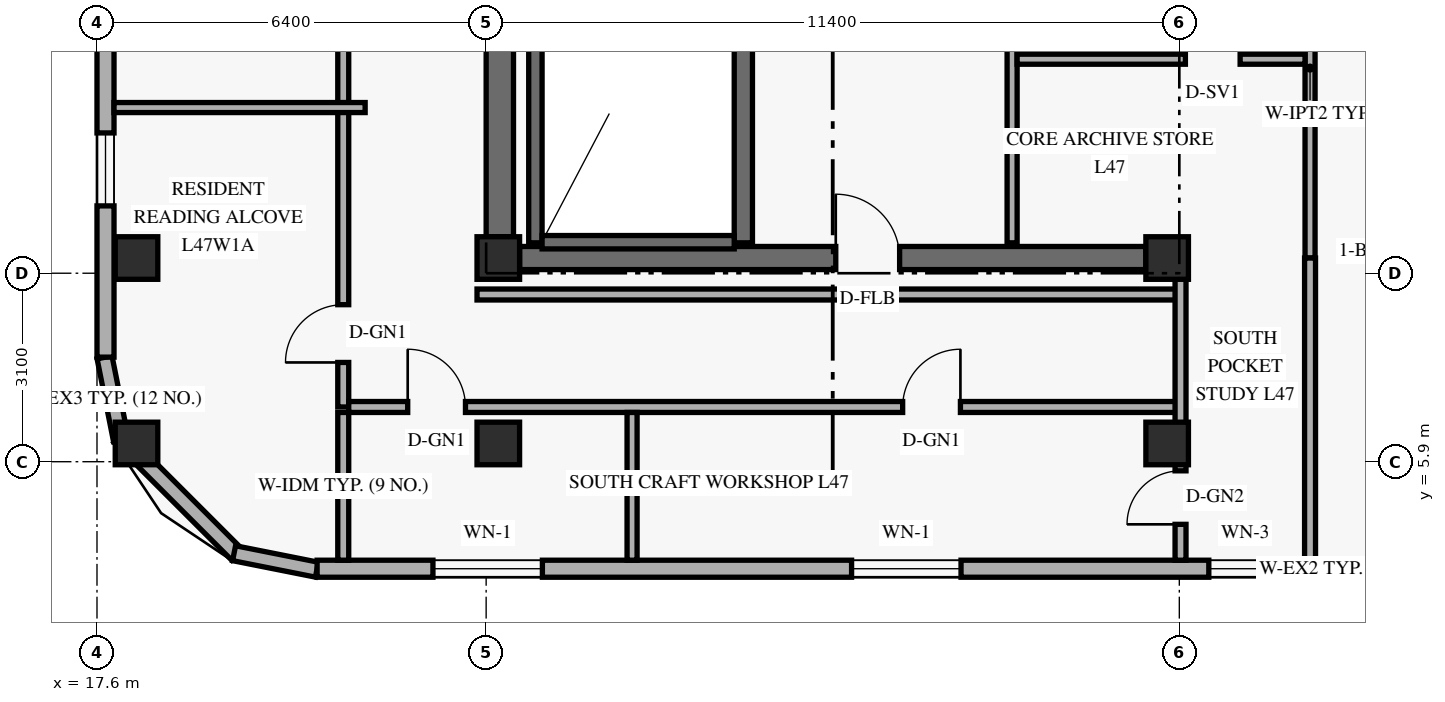
"""IFC4 building model, lengths in metres.
Left out: names, types, materials, properties, quantities, classifications, styles, units other than length and angle.
Written with IfcOpenShell. Run it as: python <this file> out.ifc"""

import sys

from ifc_helpers import new_model, si_unit, direction, frame, frame_2d, origin, origin_2d, place, context, subcontext, project, spatial, rectangle, extrude, element, fill, save


model = new_model("IFC4")
c1 = context("Model", 3, precision=1e-05, world=origin(), true_north=direction((0.0, 1.0)))
c2 = subcontext(c1, "Body", "Model", "MODEL_VIEW")
j1 = project(units=[si_unit("LENGTHUNIT", "METRE"), si_unit("PLANEANGLEUNIT", "RADIAN")], contexts=[c1])
p1 = place(None, origin())
s1 = spatial("IfcSite", under=j1, at=p1, CompositionType="ELEMENT")
p2 = place(p1, origin())
s2 = spatial("IfcBuilding", under=s1, at=p2, CompositionType="ELEMENT")
p3 = place(p2, frame((0.0, 0.0, 181.2)))
s3 = spatial("IfcBuildingStorey", under=s2, at=p3, CompositionType="ELEMENT", Elevation=181.2)
p4 = place(p3, frame((24.225, 9.6, 0.0), z_axis=(0.0, 0.0, 1.0), x_axis=(0.0, 1.0, 0.0)))
e1 = element("IfcWall", 1, at=p4, inside=s3, PredefinedType="SHEAR", context=c2, shape_type="SweptSolid", body=[
    extrude(rectangle(XDim=7.6, YDim=0.45, at=frame_2d((3.8, 0.0))), origin(), (0.0, 0.0, 1.0), 2.748),
])
p5 = place(p3, frame((24.55, 9.25, 0.0), z_axis=(0.0, 0.0, 1.0), x_axis=(1.0, 0.0, 0.0)))
e2 = element("IfcWall", 2, at=p5, inside=s3, PredefinedType="SHEAR", context=c2, shape_type="SweptSolid", body=[
    extrude(rectangle(XDim=10.3, YDim=0.38, at=frame_2d((5.15, 0.0))), origin(), (0.0, 0.0, 1.0), 3.36),
])
p6 = place(p5, frame((5.2, 0.0, 0.0)))
e3 = element("IfcOpeningElement", 3, at=p6, cuts=e2, PredefinedType="OPENING", context=c2, shape_type="SweptSolid", body=[
    extrude(rectangle(XDim=1.05, YDim=2.15, at=frame_2d((0.525, 1.075))), frame((0.0, 0.2, 0.0), z_axis=(0.0, -1.0, 0.0), x_axis=(1.0, 0.0, 0.0)), (0.0, 0.0, 1.0), 0.4),
])
p7 = place(p3, frame((24.81, 9.5, 0.0), z_axis=(0.0, 0.0, 1.0), x_axis=(0.0, 1.0, 0.0)))
e4 = element("IfcWall", 4, at=p7, inside=s3, PredefinedType="SHEAR", context=c2, shape_type="SweptSolid", body=[
    extrude(rectangle(XDim=7.76, YDim=0.22, at=frame_2d((3.88, 0.0))), origin(), (0.0, 0.0, 1.0), 3.36),
])
p8 = place(p3, frame((28.23, 9.5, 0.0), z_axis=(0.0, 0.0, 1.0), x_axis=(0.0, 1.0, 0.0)))
e5 = element("IfcWall", 5, at=p8, inside=s3, PredefinedType="SHEAR", context=c2, shape_type="SweptSolid", body=[
    extrude(rectangle(XDim=7.76, YDim=0.3, at=frame_2d((3.88, 0.0))), origin(), (0.0, 0.0, 1.0), 3.36),
])
p9 = place(p3, frame((24.92, 9.51, 0.0), z_axis=(0.0, 0.0, 1.0), x_axis=(1.0, 0.0, 0.0)))
e6 = element("IfcWall", 6, at=p9, inside=s3, PredefinedType="SHEAR", context=c2, shape_type="SweptSolid", body=[
    extrude(rectangle(XDim=3.16, YDim=0.22, at=frame_2d((1.58, 0.0))), origin(), (0.0, 0.0, 1.0), 3.36),
])
for number, where, z_axis, x_axis in (
    (7, (18.25, 6.2, 0.0), (0.0, 0.0, 1.0), (1.0, 0.0, 0.0)),
    (8, (18.25, 9.25, 0.0), (0.0, 0.0, 1.0), (1.0, 0.0, 0.0)),
    (9, (24.2, 6.2, 0.0), (0.0, 0.0, 1.0), (1.0, 0.0, 0.0)),
    (10, (24.2, 9.25, 0.0), (0.0, 0.0, 1.0), (1.0, 0.0, 0.0)),
    (11, (35.2, 6.2, 0.0), (0.0, 0.0, 1.0), (1.0, 0.0, 0.0)),
    (12, (35.2, 9.25, 0.0), (0.0, 0.0, 1.0), (1.0, 0.0, 0.0)),
):
    element("IfcColumn", number, at=place(p3, frame(where, z_axis=z_axis, x_axis=x_axis)), inside=s3, PredefinedType="COLUMN", context=c2, shape_type="SweptSolid", body=[
        extrude(rectangle(XDim=0.7, YDim=0.7, at=origin_2d()), origin(), (0.0, 0.0, 1.0), 3.6),
    ])
p10 = place(p3, frame((17.724, 7.616, 0.0), z_axis=(0.0, 0.0, 1.0), x_axis=(0.195135625965, -0.9807762678, 0.0)))
e13 = element("IfcWall", 13, at=p10, inside=s3, PredefinedType="SOLIDWALL", context=c2, shape_type="SweptSolid", body=[
    extrude(rectangle(XDim=1.389, YDim=0.25, at=frame_2d((0.694, 0.0))), origin(), (0.0, 0.0, 1.0), 3.36),
])
p11 = place(p3, frame((17.968, 6.305, 0.0), z_axis=(0.0, 0.0, 1.0), x_axis=(0.707106781187, -0.707106781187, 0.0)))
e14 = element("IfcWall", 14, at=p11, inside=s3, PredefinedType="SOLIDWALL", context=c2, shape_type="SweptSolid", body=[
    extrude(rectangle(XDim=2.739, YDim=0.25, at=frame_2d((1.37, 0.0))), origin(), (0.0, 0.0, 1.0), 3.36),
])
p12 = place(p3, frame((19.854, 4.395, 0.0), z_axis=(0.0, 0.0, 1.0), x_axis=(0.980809899341, -0.19496651342, 0.0)))
e15 = element("IfcWall", 15, at=p12, inside=s3, PredefinedType="SOLIDWALL", context=c2, shape_type="SweptSolid", body=[
    extrude(rectangle(XDim=1.389, YDim=0.25, at=frame_2d((0.694, 0.0))), origin(), (0.0, 0.0, 1.0), 3.36),
])
p13 = place(p3, frame((21.22, 4.14, 0.0), z_axis=(0.0, 0.0, 1.0), x_axis=(1.0, 0.0, 0.0)))
e16 = element("IfcWall", 16, at=p13, inside=s3, PredefinedType="SOLIDWALL", context=c2, shape_type="SweptSolid", body=[
    extrude(rectangle(XDim=33.76, YDim=0.28, at=frame_2d((16.88, 0.0))), origin(), (0.0, 0.0, 1.0), 3.36),
])
p14 = place(p13, frame((1.905, 0.0, 0.85)))
e17 = element("IfcOpeningElement", 17, at=p14, cuts=e16, PredefinedType="OPENING", context=c2, shape_type="SweptSolid", body=[
    extrude(rectangle(XDim=1.8, YDim=1.6, at=frame_2d((0.9, 0.8))), frame((0.0, 0.15, 0.0), z_axis=(0.0, -1.0, 0.0), x_axis=(1.0, 0.0, 0.0)), (0.0, 0.0, 1.0), 0.3),
])
p15 = place(p13, frame((8.79, 0.0, 0.85)))
e18 = element("IfcOpeningElement", 18, at=p15, cuts=e16, PredefinedType="OPENING", context=c2, shape_type="SweptSolid", body=[
    extrude(rectangle(XDim=1.8, YDim=1.6, at=frame_2d((0.9, 0.8))), frame((0.0, 0.15, 0.0), z_axis=(0.0, -1.0, 0.0), x_axis=(1.0, 0.0, 0.0)), (0.0, 0.0, 1.0), 0.3),
])
p16 = place(p13, frame((14.665, 0.0, 0.85)))
e19 = element("IfcOpeningElement", 19, at=p16, cuts=e16, PredefinedType="OPENING", context=c2, shape_type="SweptSolid", body=[
    extrude(rectangle(XDim=1.2, YDim=1.5, at=frame_2d((0.6, 0.75))), frame((0.0, 0.15, 0.0), z_axis=(0.0, -1.0, 0.0), x_axis=(1.0, 0.0, 0.0)), (0.0, 0.0, 1.0), 0.3),
])
p17 = place(p13, frame((18.525, 0.0, 0.85)))
e20 = element("IfcOpeningElement", 20, at=p17, cuts=e16, PredefinedType="OPENING", context=c2, shape_type="SweptSolid", body=[
    extrude(rectangle(XDim=1.8, YDim=1.6, at=frame_2d((0.9, 0.8))), frame((0.0, 0.15, 0.0), z_axis=(0.0, -1.0, 0.0), x_axis=(1.0, 0.0, 0.0)), (0.0, 0.0, 1.0), 0.3),
])
p18 = place(p13, frame((23.65, 0.0, 0.85)))
e21 = element("IfcOpeningElement", 21, at=p18, cuts=e16, PredefinedType="OPENING", context=c2, shape_type="SweptSolid", body=[
    extrude(rectangle(XDim=1.8, YDim=1.6, at=frame_2d((0.9, 0.8))), frame((0.0, 0.15, 0.0), z_axis=(0.0, -1.0, 0.0), x_axis=(1.0, 0.0, 0.0)), (0.0, 0.0, 1.0), 0.3),
])
p19 = place(p13, frame((26.88, 0.0, 0.85)))
e22 = element("IfcOpeningElement", 22, at=p19, cuts=e16, PredefinedType="OPENING", context=c2, shape_type="SweptSolid", body=[
    extrude(rectangle(XDim=1.2, YDim=1.5, at=frame_2d((0.6, 0.75))), frame((0.0, 0.15, 0.0), z_axis=(0.0, -1.0, 0.0), x_axis=(1.0, 0.0, 0.0)), (0.0, 0.0, 1.0), 0.3),
])
p20 = place(p13, frame((30.17, 0.0, 0.85)))
e23 = element("IfcOpeningElement", 23, at=p20, cuts=e16, PredefinedType="OPENING", context=c2, shape_type="SweptSolid", body=[
    extrude(rectangle(XDim=1.8, YDim=1.6, at=frame_2d((0.9, 0.8))), frame((0.0, 0.15, 0.0), z_axis=(0.0, -1.0, 0.0), x_axis=(1.0, 0.0, 0.0)), (0.0, 0.0, 1.0), 0.3),
])
p21 = place(p3, frame((17.74, 40.38, 0.0), z_axis=(0.0, 0.0, 1.0), x_axis=(0.0, -1.0, 0.0)))
e24 = element("IfcWall", 24, at=p21, inside=s3, PredefinedType="SOLIDWALL", context=c2, shape_type="SweptSolid", body=[
    extrude(rectangle(XDim=32.76, YDim=0.28, at=frame_2d((16.38, 0.0))), origin(), (0.0, 0.0, 1.0), 3.36),
])
p22 = place(p21, frame((29.073, 0.0, 0.85)))
e25 = element("IfcOpeningElement", 25, at=p22, cuts=e24, PredefinedType="OPENING", context=c2, shape_type="SweptSolid", body=[
    extrude(rectangle(XDim=1.2, YDim=1.5, at=frame_2d((0.6, 0.75))), frame((0.0, 0.15, 0.0), z_axis=(0.0, -1.0, 0.0), x_axis=(1.0, 0.0, 0.0)), (0.0, 0.0, 1.0), 0.3),
])
p23 = place(p21, frame((25.363, 0.0, 0.85)))
e26 = element("IfcOpeningElement", 26, at=p23, cuts=e24, PredefinedType="OPENING", context=c2, shape_type="SweptSolid", body=[
    extrude(rectangle(XDim=1.2, YDim=1.5, at=frame_2d((0.6, 0.75))), frame((0.0, 0.15, 0.0), z_axis=(0.0, -1.0, 0.0), x_axis=(1.0, 0.0, 0.0)), (0.0, 0.0, 1.0), 0.3),
])
p24 = place(p21, frame((15.7, 0.0, 0.85)))
e27 = element("IfcOpeningElement", 27, at=p24, cuts=e24, PredefinedType="OPENING", context=c2, shape_type="SweptSolid", body=[
    extrude(rectangle(XDim=1.2, YDim=1.5, at=frame_2d((0.6, 0.75))), frame((0.0, 0.15, 0.0), z_axis=(0.0, -1.0, 0.0), x_axis=(1.0, 0.0, 0.0)), (0.0, 0.0, 1.0), 0.3),
])
p25 = place(p21, frame((5.288, 0.0, 0.85)))
e28 = element("IfcOpeningElement", 28, at=p25, cuts=e24, PredefinedType="OPENING", context=c2, shape_type="SweptSolid", body=[
    extrude(rectangle(XDim=1.2, YDim=1.5, at=frame_2d((0.6, 0.75))), frame((0.0, 0.15, 0.0), z_axis=(0.0, -1.0, 0.0), x_axis=(1.0, 0.0, 0.0)), (0.0, 0.0, 1.0), 0.3),
])
p26 = place(p3, frame((32.65, 9.5, 0.0), z_axis=(0.0, 0.0, 1.0), x_axis=(0.0, 1.0, 0.0)))
e29 = element("IfcWall", 29, at=p26, inside=s3, PredefinedType="PARTITIONING", context=c2, shape_type="SweptSolid", body=[
    extrude(rectangle(XDim=6.08, YDim=0.165, at=frame_2d((3.04, 0.0))), origin(), (0.0, 0.0, 1.0), 3.36),
])
p27 = place(p3, frame((37.55, 9.25, 0.0), z_axis=(0.0, 0.0, 1.0), x_axis=(0.0, 1.0, 0.0)))
e30 = element("IfcWall", 30, at=p27, inside=s3, PredefinedType="PARTITIONING", context=c2, shape_type="SweptSolid", body=[
    extrude(rectangle(XDim=6.248, YDim=0.165, at=frame_2d((3.124, 0.0))), origin(), (0.0, 0.0, 1.0), 2.73),
])
p28 = place(p3, frame((32.732, 12.52, 0.0), z_axis=(0.0, 0.0, 1.0), x_axis=(1.0, 0.0, 0.0)))
e31 = element("IfcWall", 31, at=p28, inside=s3, PredefinedType="PARTITIONING", context=c2, shape_type="SweptSolid", body=[
    extrude(rectangle(XDim=4.735, YDim=0.165, at=frame_2d((2.368, 0.0))), origin(), (0.0, 0.0, 1.0), 2.73),
])
p29 = place(p28, frame((2.768, 0.0, 0.0)))
e32 = element("IfcOpeningElement", 32, at=p29, cuts=e31, PredefinedType="OPENING", context=c2, shape_type="SweptSolid", body=[
    extrude(rectangle(XDim=0.9, YDim=2.1, at=frame_2d((0.45, 1.05))), frame((0.0, 0.093, 0.0), z_axis=(0.0, -1.0, 0.0), x_axis=(1.0, 0.0, 0.0)), (0.0, 0.0, 1.0), 0.185),
])
p30 = place(p3, frame((21.65, 6.8, 0.0), z_axis=(0.0, 0.0, 1.0), x_axis=(0.0, 1.0, 0.0)))
e33 = element("IfcWall", 33, at=p30, inside=s3, PredefinedType="STANDARD", context=c2, shape_type="SweptSolid", body=[
    extrude(rectangle(XDim=34.4, YDim=0.18, at=frame_2d((17.2, 0.0))), origin(), (0.0, 0.0, 1.0), 2.73),
])
p31 = place(p30, frame((0.732, 0.0, 0.0)))
e34 = element("IfcOpeningElement", 34, at=p31, cuts=e33, PredefinedType="OPENING", context=c2, shape_type="SweptSolid", body=[
    extrude(rectangle(XDim=0.95, YDim=2.15, at=frame_2d((0.475, 1.075))), frame((0.0, 0.1, 0.0), z_axis=(0.0, -1.0, 0.0), x_axis=(1.0, 0.0, 0.0)), (0.0, 0.0, 1.0), 0.2),
])
p32 = place(p30, frame((7.768, 0.0, 0.0)))
e35 = element("IfcOpeningElement", 35, at=p32, cuts=e33, PredefinedType="OPENING", context=c2, shape_type="SweptSolid", body=[
    extrude(rectangle(XDim=0.95, YDim=2.15, at=frame_2d((0.475, 1.075))), frame((0.0, 0.1, 0.0), z_axis=(0.0, -1.0, 0.0), x_axis=(1.0, 0.0, 0.0)), (0.0, 0.0, 1.0), 0.2),
])
p33 = place(p30, frame((17.333, 0.0, 0.0)))
e36 = element("IfcOpeningElement", 36, at=p33, cuts=e33, PredefinedType="OPENING", context=c2, shape_type="SweptSolid", body=[
    extrude(rectangle(XDim=0.95, YDim=2.15, at=frame_2d((0.475, 1.075))), frame((0.0, 0.1, 0.0), z_axis=(0.0, -1.0, 0.0), x_axis=(1.0, 0.0, 0.0)), (0.0, 0.0, 1.0), 0.2),
])
p34 = place(p30, frame((29.968, 0.0, 0.0)))
e37 = element("IfcOpeningElement", 37, at=p34, cuts=e33, PredefinedType="OPENING", context=c2, shape_type="SweptSolid", body=[
    extrude(rectangle(XDim=0.95, YDim=2.15, at=frame_2d((0.475, 1.075))), frame((0.0, 0.1, 0.0), z_axis=(0.0, -1.0, 0.0), x_axis=(1.0, 0.0, 0.0)), (0.0, 0.0, 1.0), 0.2),
])
p35 = place(p3, frame((21.74, 6.8, 0.0), z_axis=(0.0, 0.0, 1.0), x_axis=(1.0, 0.0, 0.0)))
e38 = element("IfcWall", 38, at=p35, inside=s3, PredefinedType="STANDARD", context=c2, shape_type="SweptSolid", body=[
    extrude(rectangle(XDim=13.68, YDim=0.18, at=frame_2d((6.84, 0.0))), origin(), (0.0, 0.0, 1.0), 2.73),
])
p36 = place(p35, frame((0.97, 0.0, 0.0)))
e39 = element("IfcOpeningElement", 39, at=p36, cuts=e38, PredefinedType="OPENING", context=c2, shape_type="SweptSolid", body=[
    extrude(rectangle(XDim=0.95, YDim=2.15, at=frame_2d((0.475, 1.075))), frame((0.0, 0.1, 0.0), z_axis=(0.0, -1.0, 0.0), x_axis=(1.0, 0.0, 0.0)), (0.0, 0.0, 1.0), 0.2),
])
p37 = place(p35, frame((9.11, 0.0, 0.0)))
e40 = element("IfcOpeningElement", 40, at=p37, cuts=e38, PredefinedType="OPENING", context=c2, shape_type="SweptSolid", body=[
    extrude(rectangle(XDim=0.95, YDim=2.15, at=frame_2d((0.475, 1.075))), frame((0.0, 0.1, 0.0), z_axis=(0.0, -1.0, 0.0), x_axis=(1.0, 0.0, 0.0)), (0.0, 0.0, 1.0), 0.2),
])
p38 = place(p3, frame((23.85, 8.65, 0.0), z_axis=(0.0, 0.0, 1.0), x_axis=(1.0, 0.0, 0.0)))
e41 = element("IfcWall", 41, at=p38, inside=s3, PredefinedType="STANDARD", context=c2, shape_type="SweptSolid", body=[
    extrude(rectangle(XDim=11.57, YDim=0.18, at=frame_2d((5.785, 0.0))), origin(), (0.0, 0.0, 1.0), 2.73),
])
p39 = place(p3, frame((21.65, 4.28, 0.0), z_axis=(0.0, 0.0, 1.0), x_axis=(0.0, 1.0, 0.0)))
e42 = element("IfcWall", 42, at=p39, inside=s3, PredefinedType="PARTITIONING", context=c2, shape_type="SweptSolid", body=[
    extrude(rectangle(XDim=2.43, YDim=0.18, at=frame_2d((1.215, 0.0))), origin(), (0.0, 0.0, 1.0), 2.879),
])
p40 = place(p3, frame((35.42, 4.28, 0.0), z_axis=(0.0, 0.0, 1.0), x_axis=(0.0, 1.0, 0.0)))
e43 = element("IfcWall", 43, at=p40, inside=s3, PredefinedType="PARTITIONING", context=c2, shape_type="SweptSolid", body=[
    extrude(rectangle(XDim=4.97, YDim=0.18, at=frame_2d((2.485, 0.0))), origin(), (0.0, 0.0, 1.0), 2.73),
])
p41 = place(p40, frame((0.59, 0.0, 0.0)))
e44 = element("IfcOpeningElement", 44, at=p41, cuts=e43, PredefinedType="OPENING", context=c2, shape_type="SweptSolid", body=[
    extrude(rectangle(XDim=0.88, YDim=2.12, at=frame_2d((0.44, 1.06))), frame((0.0, 0.1, 0.0), z_axis=(0.0, -1.0, 0.0), x_axis=(1.0, 0.0, 0.0)), (0.0, 0.0, 1.0), 0.2),
])
p42 = place(p3, frame((37.55, 4.28, 0.0), z_axis=(0.0, 0.0, 1.0), x_axis=(0.0, 1.0, 0.0)))
e45 = element("IfcWall", 45, at=p42, inside=s3, PredefinedType="PARTITIONING", context=c2, shape_type="SweptSolid", body=[
    extrude(rectangle(XDim=4.97, YDim=0.18, at=frame_2d((2.485, 0.0))), origin(), (0.0, 0.0, 1.0), 2.73),
])
p43 = place(p3, frame((17.88, 11.725, 0.0), z_axis=(0.0, 0.0, 1.0), x_axis=(1.0, 0.0, 0.0)))
e46 = element("IfcWall", 46, at=p43, inside=s3, PredefinedType="PARTITIONING", context=c2, shape_type="SweptSolid", body=[
    extrude(rectangle(XDim=4.13, YDim=0.165, at=frame_2d((2.065, 0.0))), origin(), (0.0, 0.0, 1.0), 2.879),
])
p44 = place(p3, frame((26.4, 4.28, 0.0), z_axis=(0.0, 0.0, 1.0), x_axis=(0.0, 1.0, 0.0)))
e47 = element("IfcWall", 47, at=p44, inside=s3, PredefinedType="PARTITIONING", context=c2, shape_type="SweptSolid", body=[
    extrude(rectangle(XDim=2.43, YDim=0.165, at=frame_2d((1.215, 0.0))), origin(), (0.0, 0.0, 1.0), 2.879),
])
p45 = place(p14, origin())
e48 = element("IfcWindow", 48, at=p45, inside=s3, PartitioningType="SINGLE_PANEL", PredefinedType="WINDOW", context=c2, shape_type="SweptSolid", body=[
    extrude(rectangle(XDim=1.8, YDim=1.6, at=frame_2d((0.9, 0.8))), frame((0.0, 0.03, 0.0), z_axis=(0.0, -1.0, 0.0), x_axis=(1.0, 0.0, 0.0)), (0.0, 0.0, 1.0), 0.06),
])
fill(e17, e48)
p46 = place(p15, origin())
e49 = element("IfcWindow", 49, at=p46, inside=s3, PartitioningType="SINGLE_PANEL", PredefinedType="WINDOW", context=c2, shape_type="SweptSolid", body=[
    extrude(rectangle(XDim=1.8, YDim=1.6, at=frame_2d((0.9, 0.8))), frame((0.0, 0.03, 0.0), z_axis=(0.0, -1.0, 0.0), x_axis=(1.0, 0.0, 0.0)), (0.0, 0.0, 1.0), 0.06),
])
fill(e18, e49)
p47 = place(p16, origin())
e50 = element("IfcWindow", 50, at=p47, inside=s3, PartitioningType="SINGLE_PANEL", PredefinedType="WINDOW", context=c2, shape_type="SweptSolid", body=[
    extrude(rectangle(XDim=1.2, YDim=1.5, at=frame_2d((0.6, 0.75))), frame((0.0, 0.03, 0.0), z_axis=(0.0, -1.0, 0.0), x_axis=(1.0, 0.0, 0.0)), (0.0, 0.0, 1.0), 0.06),
])
fill(e19, e50)
p48 = place(p22, origin())
e51 = element("IfcWindow", 51, at=p48, inside=s3, PartitioningType="SINGLE_PANEL", PredefinedType="WINDOW", context=c2, shape_type="SweptSolid", body=[
    extrude(rectangle(XDim=1.2, YDim=1.5, at=frame_2d((0.6, 0.75))), frame((0.0, 0.03, 0.0), z_axis=(0.0, -1.0, 0.0), x_axis=(1.0, 0.0, 0.0)), (0.0, 0.0, 1.0), 0.06),
])
fill(e25, e51)
p49 = place(p29, origin())
e52 = element("IfcDoor", 52, at=p49, inside=s3, OperationType="SINGLE_SWING_RIGHT", PredefinedType="DOOR", context=c2, shape_type="SweptSolid", body=[
    extrude(rectangle(XDim=0.9, YDim=2.1, at=frame_2d((0.45, 1.05))), frame((0.0, 0.025, 0.0), z_axis=(0.0, -1.0, 0.0), x_axis=(1.0, 0.0, 0.0)), (0.0, 0.0, 1.0), 0.05),
])
fill(e32, e52)
p50 = place(p6, origin())
e53 = element("IfcDoor", 53, at=p50, inside=s3, OperationType="SINGLE_SWING_LEFT", PredefinedType="DOOR", context=c2, shape_type="SweptSolid", body=[
    extrude(rectangle(XDim=1.05, YDim=2.15, at=frame_2d((0.525, 1.075))), frame((0.0, 0.025, 0.0), z_axis=(0.0, -1.0, 0.0), x_axis=(1.0, 0.0, 0.0)), (0.0, 0.0, 1.0), 0.05),
])
fill(e3, e53)
p51 = place(p41, origin())
e54 = element("IfcDoor", 54, at=p51, inside=s3, OperationType="SINGLE_SWING_LEFT", PredefinedType="DOOR", context=c2, shape_type="SweptSolid", body=[
    extrude(rectangle(XDim=0.88, YDim=2.12, at=frame_2d((0.44, 1.06))), frame((0.0, 0.025, 0.0), z_axis=(0.0, -1.0, 0.0), x_axis=(1.0, 0.0, 0.0)), (0.0, 0.0, 1.0), 0.05),
])
fill(e44, e54)
p52 = place(p31, origin())
e55 = element("IfcDoor", 55, at=p52, inside=s3, OperationType="SINGLE_SWING_LEFT", PredefinedType="DOOR", context=c2, shape_type="SweptSolid", body=[
    extrude(rectangle(XDim=0.95, YDim=2.15, at=frame_2d((0.475, 1.075))), frame((0.0, 0.025, 0.0), z_axis=(0.0, -1.0, 0.0), x_axis=(1.0, 0.0, 0.0)), (0.0, 0.0, 1.0), 0.05),
])
fill(e34, e55)
p53 = place(p36, origin())
e56 = element("IfcDoor", 56, at=p53, inside=s3, OperationType="SINGLE_SWING_LEFT", PredefinedType="DOOR", context=c2, shape_type="SweptSolid", body=[
    extrude(rectangle(XDim=0.95, YDim=2.15, at=frame_2d((0.475, 1.075))), frame((0.0, 0.025, 0.0), z_axis=(0.0, -1.0, 0.0), x_axis=(1.0, 0.0, 0.0)), (0.0, 0.0, 1.0), 0.05),
])
fill(e39, e56)
p54 = place(p37, origin())
e57 = element("IfcDoor", 57, at=p54, inside=s3, OperationType="SINGLE_SWING_RIGHT", PredefinedType="DOOR", context=c2, shape_type="SweptSolid", body=[
    extrude(rectangle(XDim=0.95, YDim=2.15, at=frame_2d((0.475, 1.075))), frame((0.0, 0.025, 0.0), z_axis=(0.0, -1.0, 0.0), x_axis=(1.0, 0.0, 0.0)), (0.0, 0.0, 1.0), 0.05),
])
fill(e40, e57)
save(model, sys.argv[1])
